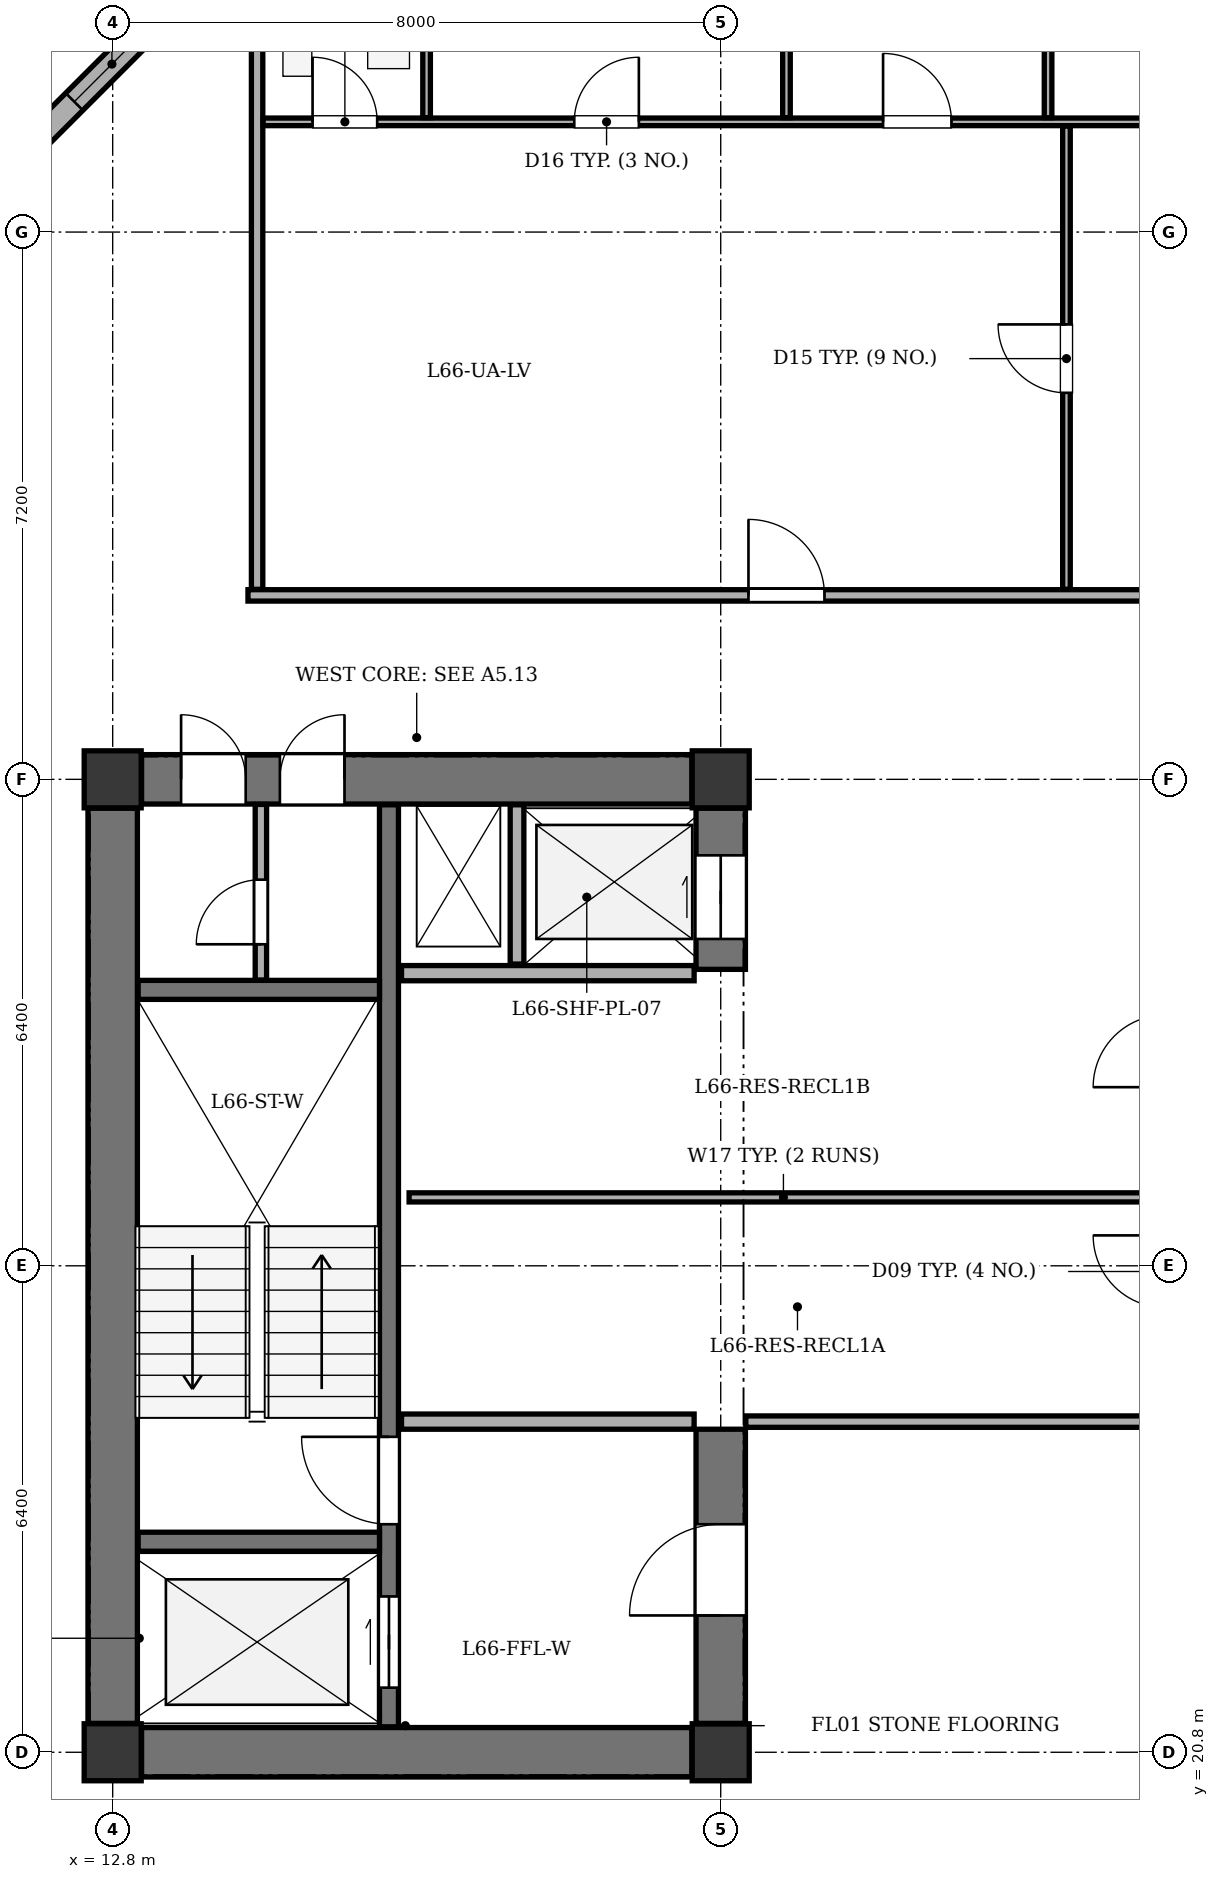
"""IFC4 building model, lengths in metres.
Left out: names, types, materials, properties, quantities, classifications, styles, units other than length and angle.
Written with IfcOpenShell. Run it as: python <this file> out.ifc"""

import sys

from ifc_helpers import new_model, si_unit, direction, frame, frame_2d, origin, origin_2d, place, context, subcontext, project, spatial, rectangle, extrude, element, fill, save


model = new_model("IFC4")
c1 = context("Model", 3, precision=1e-05, world=origin(), true_north=direction((0.0, 1.0)))
c2 = subcontext(c1, "Body", "Model", "MODEL_VIEW")
j1 = project(units=[si_unit("LENGTHUNIT", "METRE"), si_unit("PLANEANGLEUNIT", "RADIAN")], contexts=[c1])
p1 = place(None, origin())
s1 = spatial("IfcSite", under=j1, at=p1, CompositionType="ELEMENT")
p2 = place(p1, origin())
s2 = spatial("IfcBuilding", under=s1, at=p2, CompositionType="ELEMENT")
p3 = place(p2, frame((0.0, 0.0, 251.7)))
s3 = spatial("IfcBuildingStorey", under=s2, at=p3, CompositionType="ELEMENT", Elevation=251.7)
for number, where, z_axis, x_axis in (
    (1, (12.8, 20.8, 0.0), (0.0, 0.0, 1.0), (1.0, 0.0, 0.0)),
    (2, (20.8, 20.8, 0.0), (0.0, 0.0, 1.0), (1.0, 0.0, 0.0)),
    (3, (12.8, 33.6, 0.0), (0.0, 0.0, 1.0), (1.0, 0.0, 0.0)),
    (4, (20.8, 33.6, 0.0), (0.0, 0.0, 1.0), (1.0, 0.0, 0.0)),
):
    element("IfcColumn", number, at=place(p3, frame(where, z_axis=z_axis, x_axis=x_axis)), inside=s3, PredefinedType="COLUMN", context=c2, shape_type="SweptSolid", body=[
        extrude(rectangle(XDim=0.75, YDim=0.75, at=origin_2d()), origin(), (0.0, 0.0, 1.0), 3.4),
    ])
p4 = place(p3, frame((10.88, 41.1, 0.0), z_axis=(0.0, 0.0, 1.0), x_axis=(0.70712937715, 0.707084184501, 0.0)))
e5 = element("IfcWall", 5, at=p4, inside=s3, PredefinedType="STANDARD", context=c2, shape_type="SweptSolid", body=[
    extrude(rectangle(XDim=5.402, YDim=0.32, at=frame_2d((2.701, 0.0))), origin(), (0.0, 0.0, 1.0), 2.725),
])
p5 = place(p4, frame((2.001, 0.0, 0.75)))
e6 = element("IfcOpeningElement", 6, at=p5, cuts=e5, PredefinedType="OPENING", context=c2, shape_type="SweptSolid", body=[
    extrude(rectangle(XDim=1.4, YDim=1.65, at=frame_2d((0.7, 0.825))), frame((0.0, 0.17, 0.0), z_axis=(0.0, -1.0, 0.0), x_axis=(1.0, 0.0, 0.0)), (0.0, 0.0, 1.0), 0.34),
])
p6 = place(p3, frame((12.8, 21.18, 0.0), z_axis=(0.0, 0.0, 1.0), x_axis=(0.0, 1.0, 0.0)))
e7 = element("IfcWall", 7, at=p6, inside=s3, PredefinedType="SHEAR", context=c2, shape_type="SweptSolid", body=[
    extrude(rectangle(XDim=12.04, YDim=0.65, at=frame_2d((6.02, 0.0))), origin(), (0.0, 0.0, 1.0), 3.1),
])
p7 = place(p3, frame((13.18, 20.8, 0.0), z_axis=(0.0, 0.0, 1.0), x_axis=(1.0, 0.0, 0.0)))
e8 = element("IfcWall", 8, at=p7, inside=s3, PredefinedType="SHEAR", context=c2, shape_type="SweptSolid", body=[
    extrude(rectangle(XDim=7.24, YDim=0.65, at=frame_2d((3.62, 0.0))), origin(), (0.0, 0.0, 1.0), 3.1),
])
p8 = place(p3, frame((13.18, 33.6, 0.0), z_axis=(0.0, 0.0, 1.0), x_axis=(1.0, 0.0, 0.0)))
e9 = element("IfcWall", 9, at=p8, inside=s3, PredefinedType="SHEAR", context=c2, shape_type="SweptSolid", body=[
    extrude(rectangle(XDim=7.24, YDim=0.65, at=frame_2d((3.62, 0.0))), origin(), (0.0, 0.0, 1.0), 3.1),
])
p9 = place(p8, frame((0.52, 0.0, 0.0)))
e10 = element("IfcOpeningElement", 10, at=p9, cuts=e9, PredefinedType="OPENING", context=c2, shape_type="SweptSolid", body=[
    extrude(rectangle(XDim=0.85, YDim=2.02, at=frame_2d((0.425, 1.01))), frame((0.0, 0.335, 0.0), z_axis=(0.0, -1.0, 0.0), x_axis=(1.0, 0.0, 0.0)), (0.0, 0.0, 1.0), 0.67),
])
p10 = place(p8, frame((1.82, 0.0, 0.0)))
e11 = element("IfcOpeningElement", 11, at=p10, cuts=e9, PredefinedType="OPENING", context=c2, shape_type="SweptSolid", body=[
    extrude(rectangle(XDim=0.85, YDim=2.02, at=frame_2d((0.425, 1.01))), frame((0.0, 0.335, 0.0), z_axis=(0.0, -1.0, 0.0), x_axis=(1.0, 0.0, 0.0)), (0.0, 0.0, 1.0), 0.67),
])
p11 = place(p3, frame((20.8, 21.18, 0.0), z_axis=(0.0, 0.0, 1.0), x_axis=(0.0, 1.0, 0.0)))
e12 = element("IfcWall", 12, at=p11, inside=s3, PredefinedType="SHEAR", context=c2, shape_type="SweptSolid", body=[
    extrude(rectangle(XDim=3.87, YDim=0.65, at=frame_2d((1.935, 0.0))), origin(), (0.0, 0.0, 1.0), 3.1),
])
p12 = place(p11, frame((1.42, 0.0, 0.0)))
e13 = element("IfcOpeningElement", 13, at=p12, cuts=e12, PredefinedType="OPENING", context=c2, shape_type="SweptSolid", body=[
    extrude(rectangle(XDim=1.2, YDim=2.15, at=frame_2d((0.6, 1.075))), frame((0.0, 0.335, 0.0), z_axis=(0.0, -1.0, 0.0), x_axis=(1.0, 0.0, 0.0)), (0.0, 0.0, 1.0), 0.67),
])
p13 = place(p3, frame((20.8, 31.1, 0.0), z_axis=(0.0, 0.0, 1.0), x_axis=(0.0, 1.0, 0.0)))
e14 = element("IfcWall", 14, at=p13, inside=s3, PredefinedType="SHEAR", context=c2, shape_type="SweptSolid", body=[
    extrude(rectangle(XDim=2.12, YDim=0.65, at=frame_2d((1.06, 0.0))), origin(), (0.0, 0.0, 1.0), 3.1),
])
p14 = place(p13, frame((0.4, 0.0, 0.0)))
e15 = element("IfcOpeningElement", 15, at=p14, cuts=e14, PredefinedType="OPENING", context=c2, shape_type="SweptSolid", body=[
    extrude(rectangle(XDim=1.1, YDim=2.1, at=frame_2d((0.55, 1.05))), frame((0.0, 0.335, 0.0), z_axis=(0.0, -1.0, 0.0), x_axis=(1.0, 0.0, 0.0)), (0.0, 0.0, 1.0), 0.67),
])
p15 = place(p3, frame((16.435, 21.135, 0.0), z_axis=(0.0, 0.0, 1.0), x_axis=(0.0, 1.0, 0.0)))
e16 = element("IfcWall", 16, at=p15, inside=s3, PredefinedType="SHEAR", context=c2, shape_type="SweptSolid", body=[
    extrude(rectangle(XDim=12.13, YDim=0.25, at=frame_2d((6.065, 0.0))), origin(), (0.0, 0.0, 1.0), 3.1),
])
p16 = place(p15, frame((0.515, 0.0, 0.0)))
e17 = element("IfcOpeningElement", 17, at=p16, cuts=e16, PredefinedType="OPENING", context=c2, shape_type="SweptSolid", body=[
    extrude(rectangle(XDim=1.2, YDim=2.15, at=frame_2d((0.6, 1.075))), frame((0.0, 0.135, 0.0), z_axis=(0.0, -1.0, 0.0), x_axis=(1.0, 0.0, 0.0)), (0.0, 0.0, 1.0), 0.27),
])
p17 = place(p15, frame((2.665, 0.0, 0.0)))
e18 = element("IfcOpeningElement", 18, at=p17, cuts=e16, PredefinedType="OPENING", context=c2, shape_type="SweptSolid", body=[
    extrude(rectangle(XDim=1.15, YDim=2.15, at=frame_2d((0.575, 1.075))), frame((0.0, 0.135, 0.0), z_axis=(0.0, -1.0, 0.0), x_axis=(1.0, 0.0, 0.0)), (0.0, 0.0, 1.0), 0.27),
])
for number, where, z_axis, x_axis in (
    (19, (13.135, 23.57, 0.0), (0.0, 0.0, 1.0), (1.0, 0.0, 0.0)),
    (20, (13.135, 30.83, 0.0), (0.0, 0.0, 1.0), (1.0, 0.0, 0.0)),
):
    element("IfcWall", number, at=place(p3, frame(where, z_axis=z_axis, x_axis=x_axis)), inside=s3, PredefinedType="SHEAR", context=c2, shape_type="SweptSolid", body=[
        extrude(rectangle(XDim=3.175, YDim=0.25, at=frame_2d((1.587, 0.0))), origin(), (0.0, 0.0, 1.0), 3.1),
    ])
for number, where, z_axis, x_axis in (
    (21, (16.6, 25.15, 0.0), (0.0, 0.0, 1.0), (1.0, 0.0, 0.0)),
    (22, (16.6, 31.05, 0.0), (0.0, 0.0, 1.0), (1.0, 0.0, 0.0)),
):
    element("IfcWall", number, at=place(p3, frame(where, z_axis=z_axis, x_axis=x_axis)), inside=s3, PredefinedType="SOLIDWALL", context=c2, shape_type="SweptSolid", body=[
        extrude(rectangle(XDim=3.85, YDim=0.2, at=frame_2d((1.925, 0.0))), origin(), (0.0, 0.0, 1.0), 3.1),
    ])
p18 = place(p3, frame((18.12, 31.17, 0.0), z_axis=(0.0, 0.0, 1.0), x_axis=(0.0, 1.0, 0.0)))
e23 = element("IfcWall", 23, at=p18, inside=s3, PredefinedType="PARTITIONING", context=c2, shape_type="SweptSolid", body=[
    extrude(rectangle(XDim=2.095, YDim=0.18, at=frame_2d((1.047, 0.0))), origin(), (0.0, 0.0, 1.0), 3.1),
])
p19 = place(p3, frame((14.75, 30.96, 0.0), z_axis=(0.0, 0.0, 1.0), x_axis=(0.0, 1.0, 0.0)))
e24 = element("IfcWall", 24, at=p19, inside=s3, PredefinedType="PARTITIONING", context=c2, shape_type="SweptSolid", body=[
    extrude(rectangle(XDim=2.31, YDim=0.15, at=frame_2d((1.155, 0.0))), origin(), (0.0, 0.0, 1.0), 3.1),
])
p20 = place(p19, frame((0.47, 0.0, 0.0)))
e25 = element("IfcOpeningElement", 25, at=p20, cuts=e24, PredefinedType="OPENING", context=c2, shape_type="SweptSolid", body=[
    extrude(rectangle(XDim=0.85, YDim=2.02, at=frame_2d((0.425, 1.01))), frame((0.0, 0.085, 0.0), z_axis=(0.0, -1.0, 0.0), x_axis=(1.0, 0.0, 0.0)), (0.0, 0.0, 1.0), 0.17),
])
p21 = place(p3, frame((21.13, 25.15, 0.0), z_axis=(0.0, 0.0, 1.0), x_axis=(1.0, 0.0, 0.0)))
e26 = element("IfcWall", 26, at=p21, inside=s3, PredefinedType="PARTITIONING", context=c2, shape_type="SweptSolid", body=[
    extrude(rectangle(XDim=5.52, YDim=0.15, at=frame_2d((2.76, 0.0))), origin(), (0.0, 0.0, 1.0), 3.1),
])
p22 = place(p3, frame((16.7, 28.1, 0.0), z_axis=(0.0, 0.0, 1.0), x_axis=(1.0, 0.0, 0.0)))
e27 = element("IfcWall", 27, at=p22, inside=s3, PredefinedType="PARTITIONING", context=c2, shape_type="SweptSolid", body=[
    extrude(rectangle(XDim=9.85, YDim=0.12, at=frame_2d((4.925, 0.0))), origin(), (0.0, 0.0, 1.0), 3.1),
])
p23 = place(p3, frame((14.58, 36.02, 0.0), z_axis=(0.0, 0.0, 1.0), x_axis=(1.0, 0.0, 0.0)))
e28 = element("IfcWall", 28, at=p23, inside=s3, PredefinedType="PARTITIONING", context=c2, shape_type="SweptSolid", body=[
    extrude(rectangle(XDim=30.52, YDim=0.15, at=frame_2d((15.26, 0.0))), origin(), (0.0, 0.0, 1.0), 3.1),
])
p24 = place(p23, frame((6.585, 0.0, 0.0)))
e29 = element("IfcOpeningElement", 29, at=p24, cuts=e28, PredefinedType="OPENING", context=c2, shape_type="SweptSolid", body=[
    extrude(rectangle(XDim=1.0, YDim=2.1, at=frame_2d((0.5, 1.05))), frame((0.0, 0.085, 0.0), z_axis=(0.0, -1.0, 0.0), x_axis=(1.0, 0.0, 0.0)), (0.0, 0.0, 1.0), 0.17),
])
p25 = place(p23, frame((21.724, 0.0, 0.0)))
e30 = element("IfcOpeningElement", 30, at=p25, cuts=e28, PredefinedType="OPENING", context=c2, shape_type="SweptSolid", body=[
    extrude(rectangle(XDim=1.0, YDim=2.1, at=frame_2d((0.5, 1.05))), frame((0.0, 0.085, 0.0), z_axis=(0.0, -1.0, 0.0), x_axis=(1.0, 0.0, 0.0)), (0.0, 0.0, 1.0), 0.17),
])
p26 = place(p3, frame((14.7, 36.1, 0.0), z_axis=(0.0, 0.0, 1.0), x_axis=(0.0, 1.0, 0.0)))
e31 = element("IfcWall", 31, at=p26, inside=s3, PredefinedType="PARTITIONING", context=c2, shape_type="SweptSolid", body=[
    extrude(rectangle(XDim=8.655, YDim=0.15, at=frame_2d((4.327, 0.0))), origin(), (0.0, 0.0, 1.0), 3.1),
])
p27 = place(p3, frame((14.78, 42.25, 0.0), z_axis=(0.0, 0.0, 1.0), x_axis=(1.0, 0.0, 0.0)))
e32 = element("IfcWall", 32, at=p27, inside=s3, PredefinedType="PARTITIONING", context=c2, shape_type="SweptSolid", body=[
    extrude(rectangle(XDim=13.889, YDim=0.1, at=frame_2d((6.944, 0.0))), origin(), (0.0, 0.0, 1.0), 3.1),
])
p28 = place(p27, frame((0.65, 0.0, 0.0)))
e33 = element("IfcOpeningElement", 33, at=p28, cuts=e32, PredefinedType="OPENING", context=c2, shape_type="SweptSolid", body=[
    extrude(rectangle(XDim=0.85, YDim=2.05, at=frame_2d((0.425, 1.025))), frame((0.0, 0.06, 0.0), z_axis=(0.0, -1.0, 0.0), x_axis=(1.0, 0.0, 0.0)), (0.0, 0.0, 1.0), 0.12),
])
p29 = place(p27, frame((4.093, 0.0, 0.0)))
e34 = element("IfcOpeningElement", 34, at=p29, cuts=e32, PredefinedType="OPENING", context=c2, shape_type="SweptSolid", body=[
    extrude(rectangle(XDim=0.85, YDim=2.05, at=frame_2d((0.425, 1.025))), frame((0.0, 0.06, 0.0), z_axis=(0.0, -1.0, 0.0), x_axis=(1.0, 0.0, 0.0)), (0.0, 0.0, 1.0), 0.12),
])
p30 = place(p27, frame((8.156, 0.0, 0.0)))
e35 = element("IfcOpeningElement", 35, at=p30, cuts=e32, PredefinedType="OPENING", context=c2, shape_type="SweptSolid", body=[
    extrude(rectangle(XDim=0.9, YDim=2.05, at=frame_2d((0.45, 1.025))), frame((0.0, 0.06, 0.0), z_axis=(0.0, -1.0, 0.0), x_axis=(1.0, 0.0, 0.0)), (0.0, 0.0, 1.0), 0.12),
])
p31 = place(p27, frame((11.598, 0.0, 0.0)))
e36 = element("IfcOpeningElement", 36, at=p31, cuts=e32, PredefinedType="OPENING", context=c2, shape_type="SweptSolid", body=[
    extrude(rectangle(XDim=0.9, YDim=2.05, at=frame_2d((0.45, 1.025))), frame((0.0, 0.06, 0.0), z_axis=(0.0, -1.0, 0.0), x_axis=(1.0, 0.0, 0.0)), (0.0, 0.0, 1.0), 0.12),
])
p32 = place(p3, frame((25.349, 36.1, 0.0), z_axis=(0.0, 0.0, 1.0), x_axis=(0.0, 1.0, 0.0)))
e37 = element("IfcWall", 37, at=p32, inside=s3, PredefinedType="PARTITIONING", context=c2, shape_type="SweptSolid", body=[
    extrude(rectangle(XDim=6.095, YDim=0.1, at=frame_2d((3.047, 0.0))), origin(), (0.0, 0.0, 1.0), 3.1),
])
p33 = place(p32, frame((2.585, 0.0, 0.0)))
e38 = element("IfcOpeningElement", 38, at=p33, cuts=e37, PredefinedType="OPENING", context=c2, shape_type="SweptSolid", body=[
    extrude(rectangle(XDim=0.9, YDim=2.05, at=frame_2d((0.45, 1.025))), frame((0.0, 0.06, 0.0), z_axis=(0.0, -1.0, 0.0), x_axis=(1.0, 0.0, 0.0)), (0.0, 0.0, 1.0), 0.12),
])
for number, where, z_axis, x_axis in (
    (39, (16.93, 42.305, 0.0), (0.0, 0.0, 1.0), (0.0, 1.0, 0.0)),
    (40, (21.665, 42.305, 0.0), (0.0, 0.0, 1.0), (0.0, 1.0, 0.0)),
    (41, (25.107, 42.305, 0.0), (0.0, 0.0, 1.0), (0.0, 1.0, 0.0)),
):
    element("IfcWall", number, at=place(p3, frame(where, z_axis=z_axis, x_axis=x_axis)), inside=s3, PredefinedType="PARTITIONING", context=c2, shape_type="SweptSolid", body=[
        extrude(rectangle(XDim=2.45, YDim=0.1, at=frame_2d((1.225, 0.0))), origin(), (0.0, 0.0, 1.0), 3.1),
    ])
p34 = place(p5, origin())
e42 = element("IfcWindow", 42, at=p34, inside=s3, PartitioningType="SINGLE_PANEL", PredefinedType="WINDOW", context=c2, shape_type="SweptSolid", body=[
    extrude(rectangle(XDim=1.4, YDim=1.65, at=frame_2d((0.7, 0.825))), frame((0.0, -0.01, 0.0), z_axis=(0.0, -1.0, 0.0), x_axis=(1.0, 0.0, 0.0)), (0.0, 0.0, 1.0), 0.06),
])
fill(e6, e42)
p35 = place(p9, origin())
e43 = element("IfcDoor", 43, at=p35, inside=s3, OperationType="SINGLE_SWING_LEFT", PredefinedType="DOOR", context=c2, shape_type="SweptSolid", body=[
    extrude(rectangle(XDim=0.85, YDim=2.02, at=frame_2d((0.425, 1.01))), frame((0.0, 0.025, 0.0), z_axis=(0.0, -1.0, 0.0), x_axis=(1.0, 0.0, 0.0)), (0.0, 0.0, 1.0), 0.05),
])
fill(e10, e43)
p36 = place(p10, origin())
e44 = element("IfcDoor", 44, at=p36, inside=s3, OperationType="SINGLE_SWING_RIGHT", PredefinedType="DOOR", context=c2, shape_type="SweptSolid", body=[
    extrude(rectangle(XDim=0.85, YDim=2.02, at=frame_2d((0.425, 1.01))), frame((0.0, 0.025, 0.0), z_axis=(0.0, -1.0, 0.0), x_axis=(1.0, 0.0, 0.0)), (0.0, 0.0, 1.0), 0.05),
])
fill(e11, e44)
p37 = place(p12, origin())
e45 = element("IfcDoor", 45, at=p37, inside=s3, OperationType="SINGLE_SWING_LEFT", PredefinedType="DOOR", context=c2, shape_type="SweptSolid", body=[
    extrude(rectangle(XDim=1.2, YDim=2.15, at=frame_2d((0.6, 1.075))), frame((0.0, 0.025, 0.0), z_axis=(0.0, -1.0, 0.0), x_axis=(1.0, 0.0, 0.0)), (0.0, 0.0, 1.0), 0.05),
])
fill(e13, e45)
p38 = place(p14, origin())
e46 = element("IfcDoor", 46, at=p38, inside=s3, OperationType="DOUBLE_DOOR_SLIDING", PredefinedType="DOOR", context=c2, shape_type="SweptSolid", body=[
    extrude(rectangle(XDim=1.1, YDim=2.1, at=frame_2d((0.55, 1.05))), frame((0.0, 0.025, 0.0), z_axis=(0.0, -1.0, 0.0), x_axis=(1.0, 0.0, 0.0)), (0.0, 0.0, 1.0), 0.05),
])
fill(e15, e46)
p39 = place(p16, origin())
e47 = element("IfcDoor", 47, at=p39, inside=s3, OperationType="DOUBLE_DOOR_SLIDING", PredefinedType="DOOR", context=c2, shape_type="SweptSolid", body=[
    extrude(rectangle(XDim=1.2, YDim=2.15, at=frame_2d((0.6, 1.075))), frame((0.0, 0.025, 0.0), z_axis=(0.0, -1.0, 0.0), x_axis=(1.0, 0.0, 0.0)), (0.0, 0.0, 1.0), 0.05),
])
fill(e17, e47)
p40 = place(p17, origin())
e48 = element("IfcDoor", 48, at=p40, inside=s3, OperationType="SINGLE_SWING_RIGHT", PredefinedType="DOOR", context=c2, shape_type="SweptSolid", body=[
    extrude(rectangle(XDim=1.15, YDim=2.15, at=frame_2d((0.575, 1.075))), frame((0.0, 0.025, 0.0), z_axis=(0.0, -1.0, 0.0), x_axis=(1.0, 0.0, 0.0)), (0.0, 0.0, 1.0), 0.05),
])
fill(e18, e48)
p41 = place(p20, origin())
e49 = element("IfcDoor", 49, at=p41, inside=s3, OperationType="SINGLE_SWING_LEFT", PredefinedType="DOOR", context=c2, shape_type="SweptSolid", body=[
    extrude(rectangle(XDim=0.85, YDim=2.02, at=frame_2d((0.425, 1.01))), frame((0.0, 0.025, 0.0), z_axis=(0.0, -1.0, 0.0), x_axis=(1.0, 0.0, 0.0)), (0.0, 0.0, 1.0), 0.05),
])
fill(e25, e49)
p42 = place(p24, origin())
e50 = element("IfcDoor", 50, at=p42, inside=s3, OperationType="SINGLE_SWING_LEFT", PredefinedType="DOOR", context=c2, shape_type="SweptSolid", body=[
    extrude(rectangle(XDim=1.0, YDim=2.1, at=frame_2d((0.5, 1.05))), frame((0.0, 0.025, 0.0), z_axis=(0.0, -1.0, 0.0), x_axis=(1.0, 0.0, 0.0)), (0.0, 0.0, 1.0), 0.05),
])
fill(e29, e50)
p43 = place(p33, origin())
e51 = element("IfcDoor", 51, at=p43, inside=s3, OperationType="SINGLE_SWING_RIGHT", PredefinedType="DOOR", context=c2, shape_type="SweptSolid", body=[
    extrude(rectangle(XDim=0.9, YDim=2.05, at=frame_2d((0.45, 1.025))), frame((0.0, 0.025, 0.0), z_axis=(0.0, -1.0, 0.0), x_axis=(1.0, 0.0, 0.0)), (0.0, 0.0, 1.0), 0.05),
])
fill(e38, e51)
p44 = place(p28, origin())
e52 = element("IfcDoor", 52, at=p44, inside=s3, OperationType="SINGLE_SWING_LEFT", PredefinedType="DOOR", context=c2, shape_type="SweptSolid", body=[
    extrude(rectangle(XDim=0.85, YDim=2.05, at=frame_2d((0.425, 1.025))), frame((0.0, 0.025, 0.0), z_axis=(0.0, -1.0, 0.0), x_axis=(1.0, 0.0, 0.0)), (0.0, 0.0, 1.0), 0.05),
])
fill(e33, e52)
p45 = place(p29, origin())
e53 = element("IfcDoor", 53, at=p45, inside=s3, OperationType="SINGLE_SWING_RIGHT", PredefinedType="DOOR", context=c2, shape_type="SweptSolid", body=[
    extrude(rectangle(XDim=0.85, YDim=2.05, at=frame_2d((0.425, 1.025))), frame((0.0, 0.025, 0.0), z_axis=(0.0, -1.0, 0.0), x_axis=(1.0, 0.0, 0.0)), (0.0, 0.0, 1.0), 0.05),
])
fill(e34, e53)
p46 = place(p30, origin())
e54 = element("IfcDoor", 54, at=p46, inside=s3, OperationType="SINGLE_SWING_LEFT", PredefinedType="DOOR", context=c2, shape_type="SweptSolid", body=[
    extrude(rectangle(XDim=0.9, YDim=2.05, at=frame_2d((0.45, 1.025))), frame((0.0, 0.025, 0.0), z_axis=(0.0, -1.0, 0.0), x_axis=(1.0, 0.0, 0.0)), (0.0, 0.0, 1.0), 0.05),
])
fill(e35, e54)
save(model, sys.argv[1])
